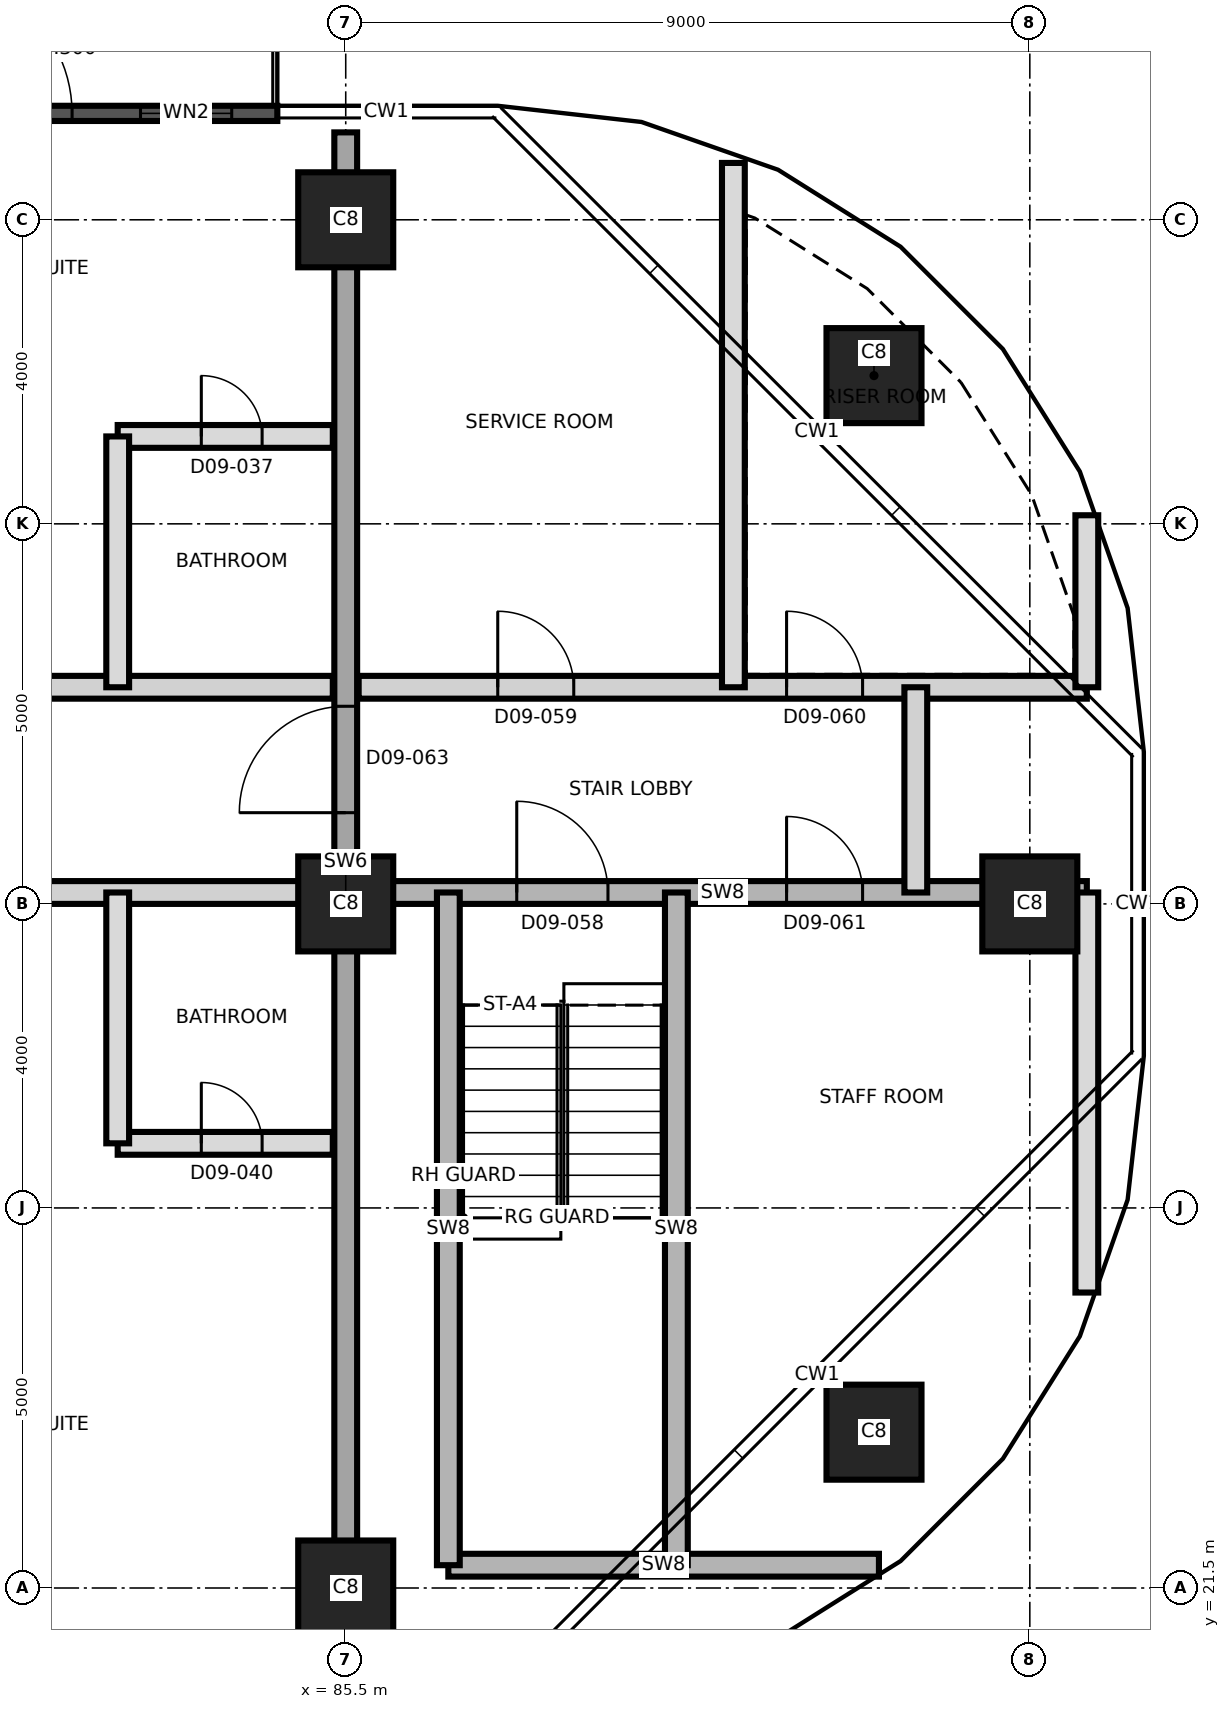
"""IFC4 building model, lengths in metres.
Left out: names, types, materials, properties, quantities, classifications, styles, units other than length and angle.
Written with IfcOpenShell. Run it as: python <this file> out.ifc"""

import sys

from ifc_helpers import new_model, si_unit, direction, frame, frame_2d, origin, origin_2d, place, context, subcontext, project, spatial, rectangle, extrude, element, fill, save


model = new_model("IFC4")
c1 = context("Model", 3, precision=1e-05, world=origin(), true_north=direction((0.0, 1.0)))
c2 = subcontext(c1, "Body", "Model", "MODEL_VIEW")
j1 = project(units=[si_unit("LENGTHUNIT", "METRE"), si_unit("PLANEANGLEUNIT", "RADIAN")], contexts=[c1])
p1 = place(None, origin())
s1 = spatial("IfcSite", under=j1, at=p1, CompositionType="ELEMENT")
p2 = place(p1, origin())
s2 = spatial("IfcBuilding", under=s1, at=p2, CompositionType="ELEMENT")
p3 = place(p2, frame((0.0, 0.0, 109.3)))
s3 = spatial("IfcBuildingStorey", under=s2, at=p3, CompositionType="ELEMENT", Elevation=109.3)
for number, where, z_axis, x_axis in (
    (1, (85.5, 21.5, 0.0), (0.0, 0.0, 1.0), (1.0, 0.0, 0.0)),
    (2, (92.45, 23.55, 0.0), (0.0, 0.0, 1.0), (1.0, 0.0, 0.0)),
    (3, (85.5, 30.5, 0.0), (0.0, 0.0, 1.0), (1.0, 0.0, 0.0)),
    (4, (94.5, 30.5, 0.0), (0.0, 0.0, 1.0), (1.0, 0.0, 0.0)),
    (5, (92.45, 37.45, 0.0), (0.0, 0.0, 1.0), (1.0, 0.0, 0.0)),
    (6, (85.5, 39.5, 0.0), (0.0, 0.0, 1.0), (1.0, 0.0, 0.0)),
):
    element("IfcColumn", number, at=place(p3, frame(where, z_axis=z_axis, x_axis=x_axis)), inside=s3, PredefinedType="COLUMN", context=c2, shape_type="SweptSolid", body=[
        extrude(rectangle(XDim=1.25, YDim=1.25, at=origin_2d()), origin(), (0.0, 0.0, 1.0), 3.7),
    ])
p4 = place(p3, frame((85.5, 20.35, 0.0), z_axis=(0.0, 0.0, 1.0), x_axis=(0.0, 1.0, 0.0)))
e7 = element("IfcWall", 7, at=p4, inside=s3, PredefinedType="SHEAR", context=c2, shape_type="SweptSolid", body=[
    extrude(rectangle(XDim=20.3, YDim=0.3, at=frame_2d((10.15, 0.0))), origin(), (0.0, 0.0, 1.0), 3.7),
])
p5 = place(p4, frame((11.35, 0.0, 0.0)))
e8 = element("IfcOpeningElement", 8, at=p5, cuts=e7, PredefinedType="OPENING", context=c2, shape_type="SweptSolid", body=[
    extrude(rectangle(XDim=1.4, YDim=2.1, at=frame_2d((0.7, 1.05))), frame((0.0, 0.16, 0.0), z_axis=(0.0, -1.0, 0.0), x_axis=(1.0, 0.0, 0.0)), (0.0, 0.0, 1.0), 0.32),
])
p6 = place(p3, frame((77.4, 40.9, 0.0), z_axis=(0.0, 0.0, 1.0), x_axis=(1.0, 0.0, 0.0)))
e9 = element("IfcWall", 9, at=p6, inside=s3, PredefinedType="SOLIDWALL", context=c2, shape_type="SweptSolid", body=[
    extrude(rectangle(XDim=7.2, YDim=0.2, at=frame_2d((3.6, 0.0))), origin(), (0.0, 0.0, 1.0), 3.4),
])
p7 = place(p6, frame((2.7, 0.0, 0.0)))
e10 = element("IfcOpeningElement", 10, at=p7, cuts=e9, PredefinedType="OPENING", context=c2, shape_type="SweptSolid", body=[
    extrude(rectangle(XDim=1.8, YDim=2.4, at=frame_2d((0.9, 1.2))), frame((0.0, 0.11, 0.0), z_axis=(0.0, -1.0, 0.0), x_axis=(1.0, 0.0, 0.0)), (0.0, 0.0, 1.0), 0.22),
])
p8 = place(p6, frame((5.4, 0.0, 0.9)))
e11 = element("IfcOpeningElement", 11, at=p8, cuts=e9, PredefinedType="OPENING", context=c2, shape_type="SweptSolid", body=[
    extrude(rectangle(XDim=1.2, YDim=2.1, at=frame_2d((0.6, 1.05))), frame((0.0, 0.11, 0.0), z_axis=(0.0, -1.0, 0.0), x_axis=(1.0, 0.0, 0.0)), (0.0, 0.0, 1.0), 0.22),
])
p9 = place(p6, frame((0.6, 0.0, 0.9)))
e12 = element("IfcOpeningElement", 12, at=p9, cuts=e9, PredefinedType="OPENING", context=c2, shape_type="SweptSolid", body=[
    extrude(rectangle(XDim=1.2, YDim=2.1, at=frame_2d((0.6, 1.05))), frame((0.0, 0.11, 0.0), z_axis=(0.0, -1.0, 0.0), x_axis=(1.0, 0.0, 0.0)), (0.0, 0.0, 1.0), 0.22),
])
p10 = place(p3, frame((86.85, 21.8, 0.0), z_axis=(0.0, 0.0, 1.0), x_axis=(1.0, 0.0, 0.0)))
e13 = element("IfcWall", 13, at=p10, inside=s3, PredefinedType="SHEAR", context=c2, shape_type="SweptSolid", body=[
    extrude(rectangle(XDim=5.665, YDim=0.3, at=frame_2d((2.833, 0.0))), origin(), (0.0, 0.0, 1.0), 3.4),
])
p11 = place(p3, frame((82.5, 27.35, 0.0), z_axis=(0.0, 0.0, 1.0), x_axis=(1.0, 0.0, 0.0)))
e14 = element("IfcWall", 14, at=p11, inside=s3, PredefinedType="PARTITIONING", context=c2, shape_type="SweptSolid", body=[
    extrude(rectangle(XDim=2.83, YDim=0.3, at=frame_2d((1.415, 0.0))), origin(), (0.0, 0.0, 1.0), 3.4),
])
p12 = place(p11, frame((1.1, 0.0, 0.0)))
e15 = element("IfcOpeningElement", 15, at=p12, cuts=e14, PredefinedType="OPENING", context=c2, shape_type="SweptSolid", body=[
    extrude(rectangle(XDim=0.8, YDim=2.1, at=frame_2d((0.4, 1.05))), frame((0.0, 0.16, 0.0), z_axis=(0.0, -1.0, 0.0), x_axis=(1.0, 0.0, 0.0)), (0.0, 0.0, 1.0), 0.32),
])
p13 = place(p3, frame((58.8, 30.65, 0.0), z_axis=(0.0, 0.0, 1.0), x_axis=(1.0, 0.0, 0.0)))
e16 = element("IfcWall", 16, at=p13, inside=s3, PredefinedType="PARTITIONING", context=c2, shape_type="SweptSolid", body=[
    extrude(rectangle(XDim=26.53, YDim=0.3, at=frame_2d((13.265, 0.0))), origin(), (0.0, 0.0, 1.0), 3.4),
])
p14 = place(p13, frame((3.115, 0.0, 0.0)))
e17 = element("IfcOpeningElement", 17, at=p14, cuts=e16, PredefinedType="OPENING", context=c2, shape_type="SweptSolid", body=[
    extrude(rectangle(XDim=1.0, YDim=2.1, at=frame_2d((0.5, 1.05))), frame((0.0, 0.16, 0.0), z_axis=(0.0, -1.0, 0.0), x_axis=(1.0, 0.0, 0.0)), (0.0, 0.0, 1.0), 0.32),
])
p15 = place(p13, frame((6.065, 0.0, 0.0)))
e18 = element("IfcOpeningElement", 18, at=p15, cuts=e16, PredefinedType="OPENING", context=c2, shape_type="SweptSolid", body=[
    extrude(rectangle(XDim=1.4, YDim=2.1, at=frame_2d((0.7, 1.05))), frame((0.0, 0.16, 0.0), z_axis=(0.0, -1.0, 0.0), x_axis=(1.0, 0.0, 0.0)), (0.0, 0.0, 1.0), 0.32),
])
p16 = place(p13, frame((9.835, 0.0, 0.0)))
e19 = element("IfcOpeningElement", 19, at=p16, cuts=e16, PredefinedType="OPENING", context=c2, shape_type="SweptSolid", body=[
    extrude(rectangle(XDim=1.2, YDim=2.1, at=frame_2d((0.6, 1.05))), frame((0.0, 0.16, 0.0), z_axis=(0.0, -1.0, 0.0), x_axis=(1.0, 0.0, 0.0)), (0.0, 0.0, 1.0), 0.32),
])
p17 = place(p13, frame((13.085, 0.0, 0.0)))
e20 = element("IfcOpeningElement", 20, at=p17, cuts=e16, PredefinedType="OPENING", context=c2, shape_type="SweptSolid", body=[
    extrude(rectangle(XDim=1.0, YDim=2.1, at=frame_2d((0.5, 1.05))), frame((0.0, 0.16, 0.0), z_axis=(0.0, -1.0, 0.0), x_axis=(1.0, 0.0, 0.0)), (0.0, 0.0, 1.0), 0.32),
])
p18 = place(p13, frame((21.7, 0.0, 0.0)))
e21 = element("IfcOpeningElement", 21, at=p18, cuts=e16, PredefinedType="OPENING", context=c2, shape_type="SweptSolid", body=[
    extrude(rectangle(XDim=1.0, YDim=2.4, at=frame_2d((0.5, 1.2))), frame((0.0, 0.16, 0.0), z_axis=(0.0, -1.0, 0.0), x_axis=(1.0, 0.0, 0.0)), (0.0, 0.0, 1.0), 0.32),
])
p19 = place(p3, frame((85.67, 30.65, 0.0), z_axis=(0.0, 0.0, 1.0), x_axis=(1.0, 0.0, 0.0)))
e22 = element("IfcWall", 22, at=p19, inside=s3, PredefinedType="SHEAR", context=c2, shape_type="SweptSolid", body=[
    extrude(rectangle(XDim=9.58, YDim=0.3, at=frame_2d((4.79, 0.0))), origin(), (0.0, 0.0, 1.0), 3.4),
])
p20 = place(p19, frame((2.08, 0.0, 0.0)))
e23 = element("IfcOpeningElement", 23, at=p20, cuts=e22, PredefinedType="OPENING", context=c2, shape_type="SweptSolid", body=[
    extrude(rectangle(XDim=1.2, YDim=2.1, at=frame_2d((0.6, 1.05))), frame((0.0, 0.16, 0.0), z_axis=(0.0, -1.0, 0.0), x_axis=(1.0, 0.0, 0.0)), (0.0, 0.0, 1.0), 0.32),
])
p21 = place(p19, frame((5.63, 0.0, 0.0)))
e24 = element("IfcOpeningElement", 24, at=p21, cuts=e22, PredefinedType="OPENING", context=c2, shape_type="SweptSolid", body=[
    extrude(rectangle(XDim=1.0, YDim=2.1, at=frame_2d((0.5, 1.05))), frame((0.0, 0.16, 0.0), z_axis=(0.0, -1.0, 0.0), x_axis=(1.0, 0.0, 0.0)), (0.0, 0.0, 1.0), 0.32),
])
p22 = place(p3, frame((58.8, 33.35, 0.0), z_axis=(0.0, 0.0, 1.0), x_axis=(1.0, 0.0, 0.0)))
e25 = element("IfcWall", 25, at=p22, inside=s3, PredefinedType="PARTITIONING", context=c2, shape_type="SweptSolid", body=[
    extrude(rectangle(XDim=26.53, YDim=0.3, at=frame_2d((13.265, 0.0))), origin(), (0.0, 0.0, 1.0), 3.4),
])
p23 = place(p22, frame((2.05, 0.0, 0.0)))
e26 = element("IfcOpeningElement", 26, at=p23, cuts=e25, PredefinedType="OPENING", context=c2, shape_type="SweptSolid", body=[
    extrude(rectangle(XDim=1.0, YDim=2.4, at=frame_2d((0.5, 1.2))), frame((0.0, 0.16, 0.0), z_axis=(0.0, -1.0, 0.0), x_axis=(1.0, 0.0, 0.0)), (0.0, 0.0, 1.0), 0.32),
])
p24 = place(p22, frame((11.95, 0.0, 0.0)))
e27 = element("IfcOpeningElement", 27, at=p24, cuts=e25, PredefinedType="OPENING", context=c2, shape_type="SweptSolid", body=[
    extrude(rectangle(XDim=1.0, YDim=2.1, at=frame_2d((0.5, 1.05))), frame((0.0, 0.16, 0.0), z_axis=(0.0, -1.0, 0.0), x_axis=(1.0, 0.0, 0.0)), (0.0, 0.0, 1.0), 0.32),
])
p25 = place(p22, frame((13.6, 0.0, 0.0)))
e28 = element("IfcOpeningElement", 28, at=p25, cuts=e25, PredefinedType="OPENING", context=c2, shape_type="SweptSolid", body=[
    extrude(rectangle(XDim=1.0, YDim=2.1, at=frame_2d((0.5, 1.05))), frame((0.0, 0.16, 0.0), z_axis=(0.0, -1.0, 0.0), x_axis=(1.0, 0.0, 0.0)), (0.0, 0.0, 1.0), 0.32),
])
p26 = place(p22, frame((21.7, 0.0, 0.0)))
e29 = element("IfcOpeningElement", 29, at=p26, cuts=e25, PredefinedType="OPENING", context=c2, shape_type="SweptSolid", body=[
    extrude(rectangle(XDim=1.0, YDim=2.4, at=frame_2d((0.5, 1.2))), frame((0.0, 0.16, 0.0), z_axis=(0.0, -1.0, 0.0), x_axis=(1.0, 0.0, 0.0)), (0.0, 0.0, 1.0), 0.32),
])
p27 = place(p3, frame((85.67, 33.35, 0.0), z_axis=(0.0, 0.0, 1.0), x_axis=(1.0, 0.0, 0.0)))
e30 = element("IfcWall", 30, at=p27, inside=s3, PredefinedType="PARTITIONING", context=c2, shape_type="SweptSolid", body=[
    extrude(rectangle(XDim=9.58, YDim=0.3, at=frame_2d((4.79, 0.0))), origin(), (0.0, 0.0, 1.0), 3.4),
])
p28 = place(p27, frame((1.83, 0.0, 0.0)))
e31 = element("IfcOpeningElement", 31, at=p28, cuts=e30, PredefinedType="OPENING", context=c2, shape_type="SweptSolid", body=[
    extrude(rectangle(XDim=1.0, YDim=2.1, at=frame_2d((0.5, 1.05))), frame((0.0, 0.16, 0.0), z_axis=(0.0, -1.0, 0.0), x_axis=(1.0, 0.0, 0.0)), (0.0, 0.0, 1.0), 0.32),
])
p29 = place(p27, frame((5.63, 0.0, 0.0)))
e32 = element("IfcOpeningElement", 32, at=p29, cuts=e30, PredefinedType="OPENING", context=c2, shape_type="SweptSolid", body=[
    extrude(rectangle(XDim=1.0, YDim=2.1, at=frame_2d((0.5, 1.05))), frame((0.0, 0.16, 0.0), z_axis=(0.0, -1.0, 0.0), x_axis=(1.0, 0.0, 0.0)), (0.0, 0.0, 1.0), 0.32),
])
p30 = place(p3, frame((82.5, 36.65, 0.0), z_axis=(0.0, 0.0, 1.0), x_axis=(1.0, 0.0, 0.0)))
e33 = element("IfcWall", 33, at=p30, inside=s3, PredefinedType="PARTITIONING", context=c2, shape_type="SweptSolid", body=[
    extrude(rectangle(XDim=2.83, YDim=0.3, at=frame_2d((1.415, 0.0))), origin(), (0.0, 0.0, 1.0), 3.4),
])
p31 = place(p30, frame((1.1, 0.0, 0.0)))
e34 = element("IfcOpeningElement", 34, at=p31, cuts=e33, PredefinedType="OPENING", context=c2, shape_type="SweptSolid", body=[
    extrude(rectangle(XDim=0.8, YDim=2.1, at=frame_2d((0.4, 1.05))), frame((0.0, 0.16, 0.0), z_axis=(0.0, -1.0, 0.0), x_axis=(1.0, 0.0, 0.0)), (0.0, 0.0, 1.0), 0.32),
])
for number, where, z_axis, x_axis in (
    (35, (82.5, 27.35, 0.0), (0.0, 0.0, 1.0), (0.0, 1.0, 0.0)),
    (36, (82.5, 33.35, 0.0), (0.0, 0.0, 1.0), (0.0, 1.0, 0.0)),
):
    element("IfcWall", number, at=place(p3, frame(where, z_axis=z_axis, x_axis=x_axis)), inside=s3, PredefinedType="PARTITIONING", context=c2, shape_type="SweptSolid", body=[
        extrude(rectangle(XDim=3.3, YDim=0.3, at=frame_2d((1.65, 0.0))), origin(), (0.0, 0.0, 1.0), 3.4),
    ])
for number, where, z_axis, x_axis in (
    (37, (86.85, 21.8, 0.0), (0.0, 0.0, 1.0), (0.0, 1.0, 0.0)),
    (38, (89.85, 21.8, 0.0), (0.0, 0.0, 1.0), (0.0, 1.0, 0.0)),
):
    element("IfcWall", number, at=place(p3, frame(where, z_axis=z_axis, x_axis=x_axis)), inside=s3, PredefinedType="SHEAR", context=c2, shape_type="SweptSolid", body=[
        extrude(rectangle(XDim=8.85, YDim=0.3, at=frame_2d((4.425, 0.0))), origin(), (0.0, 0.0, 1.0), 3.4),
    ])
p32 = place(p3, frame((90.6, 33.35, 0.0), z_axis=(0.0, 0.0, 1.0), x_axis=(0.0, 1.0, 0.0)))
e39 = element("IfcWall", 39, at=p32, inside=s3, PredefinedType="PARTITIONING", context=c2, shape_type="SweptSolid", body=[
    extrude(rectangle(XDim=6.898, YDim=0.3, at=frame_2d((3.449, 0.0))), origin(), (0.0, 0.0, 1.0), 3.4),
])
p33 = place(p3, frame((93.0, 30.65, 0.0), z_axis=(0.0, 0.0, 1.0), x_axis=(0.0, 1.0, 0.0)))
e40 = element("IfcWall", 40, at=p33, inside=s3, PredefinedType="PARTITIONING", context=c2, shape_type="SweptSolid", body=[
    extrude(rectangle(XDim=2.7, YDim=0.3, at=frame_2d((1.35, 0.0))), origin(), (0.0, 0.0, 1.0), 3.4),
])
p34 = place(p3, frame((95.25, 25.387, 0.0), z_axis=(0.0, 0.0, 1.0), x_axis=(0.0, 1.0, 0.0)))
e41 = element("IfcWall", 41, at=p34, inside=s3, PredefinedType="PARTITIONING", context=c2, shape_type="SweptSolid", body=[
    extrude(rectangle(XDim=5.263, YDim=0.3, at=frame_2d((2.631, 0.0))), origin(), (0.0, 0.0, 1.0), 3.4),
])
p35 = place(p3, frame((95.25, 33.35, 0.0), z_axis=(0.0, 0.0, 1.0), x_axis=(0.0, 1.0, 0.0)))
e42 = element("IfcWall", 42, at=p35, inside=s3, PredefinedType="PARTITIONING", context=c2, shape_type="SweptSolid", body=[
    extrude(rectangle(XDim=2.263, YDim=0.3, at=frame_2d((1.131, 0.0))), origin(), (0.0, 0.0, 1.0), 3.4),
])
p36 = place(p7, origin())
e43 = element("IfcDoor", 43, at=p36, inside=s3, OperationType="SINGLE_SWING_LEFT", PredefinedType="DOOR", context=c2, shape_type="SweptSolid", body=[
    extrude(rectangle(XDim=1.8, YDim=2.4, at=frame_2d((0.9, 1.2))), frame((0.0, 0.025, 0.0), z_axis=(0.0, -1.0, 0.0), x_axis=(1.0, 0.0, 0.0)), (0.0, 0.0, 1.0), 0.05),
])
fill(e10, e43)
p37 = place(p8, origin())
e44 = element("IfcWindow", 44, at=p37, inside=s3, PartitioningType="SINGLE_PANEL", PredefinedType="WINDOW", context=c2, shape_type="SweptSolid", body=[
    extrude(rectangle(XDim=1.2, YDim=2.1, at=frame_2d((0.6, 1.05))), frame((0.0, 0.03, 0.0), z_axis=(0.0, -1.0, 0.0), x_axis=(1.0, 0.0, 0.0)), (0.0, 0.0, 1.0), 0.06),
])
fill(e11, e44)
p38 = place(p31, origin())
e45 = element("IfcDoor", 45, at=p38, inside=s3, OperationType="SINGLE_SWING_RIGHT", PredefinedType="DOOR", context=c2, shape_type="SweptSolid", body=[
    extrude(rectangle(XDim=0.8, YDim=2.1, at=frame_2d((0.4, 1.05))), frame((0.0, 0.025, 0.0), z_axis=(0.0, -1.0, 0.0), x_axis=(1.0, 0.0, 0.0)), (0.0, 0.0, 1.0), 0.05),
])
fill(e34, e45)
p39 = place(p12, origin())
e46 = element("IfcDoor", 46, at=p39, inside=s3, OperationType="SINGLE_SWING_RIGHT", PredefinedType="DOOR", context=c2, shape_type="SweptSolid", body=[
    extrude(rectangle(XDim=0.8, YDim=2.1, at=frame_2d((0.4, 1.05))), frame((0.0, 0.025, 0.0), z_axis=(0.0, -1.0, 0.0), x_axis=(1.0, 0.0, 0.0)), (0.0, 0.0, 1.0), 0.05),
])
fill(e15, e46)
p40 = place(p20, origin())
e47 = element("IfcDoor", 47, at=p40, inside=s3, OperationType="SINGLE_SWING_LEFT", PredefinedType="DOOR", context=c2, shape_type="SweptSolid", body=[
    extrude(rectangle(XDim=1.2, YDim=2.1, at=frame_2d((0.6, 1.05))), frame((0.0, 0.025, 0.0), z_axis=(0.0, -1.0, 0.0), x_axis=(1.0, 0.0, 0.0)), (0.0, 0.0, 1.0), 0.05),
])
fill(e23, e47)
p41 = place(p28, origin())
e48 = element("IfcDoor", 48, at=p41, inside=s3, OperationType="SINGLE_SWING_LEFT", PredefinedType="DOOR", context=c2, shape_type="SweptSolid", body=[
    extrude(rectangle(XDim=1.0, YDim=2.1, at=frame_2d((0.5, 1.05))), frame((0.0, 0.025, 0.0), z_axis=(0.0, -1.0, 0.0), x_axis=(1.0, 0.0, 0.0)), (0.0, 0.0, 1.0), 0.05),
])
fill(e31, e48)
p42 = place(p29, origin())
e49 = element("IfcDoor", 49, at=p42, inside=s3, OperationType="SINGLE_SWING_RIGHT", PredefinedType="DOOR", context=c2, shape_type="SweptSolid", body=[
    extrude(rectangle(XDim=1.0, YDim=2.1, at=frame_2d((0.5, 1.05))), frame((0.0, 0.025, 0.0), z_axis=(0.0, -1.0, 0.0), x_axis=(1.0, 0.0, 0.0)), (0.0, 0.0, 1.0), 0.05),
])
fill(e32, e49)
p43 = place(p21, origin())
e50 = element("IfcDoor", 50, at=p43, inside=s3, OperationType="SINGLE_SWING_LEFT", PredefinedType="DOOR", context=c2, shape_type="SweptSolid", body=[
    extrude(rectangle(XDim=1.0, YDim=2.1, at=frame_2d((0.5, 1.05))), frame((0.0, 0.025, 0.0), z_axis=(0.0, -1.0, 0.0), x_axis=(1.0, 0.0, 0.0)), (0.0, 0.0, 1.0), 0.05),
])
fill(e24, e50)
p44 = place(p5, origin())
e51 = element("IfcDoor", 51, at=p44, inside=s3, OperationType="SINGLE_SWING_RIGHT", PredefinedType="DOOR", context=c2, shape_type="SweptSolid", body=[
    extrude(rectangle(XDim=1.4, YDim=2.1, at=frame_2d((0.7, 1.05))), frame((0.0, 0.025, 0.0), z_axis=(0.0, -1.0, 0.0), x_axis=(1.0, 0.0, 0.0)), (0.0, 0.0, 1.0), 0.05),
])
fill(e8, e51)
save(model, sys.argv[1])
